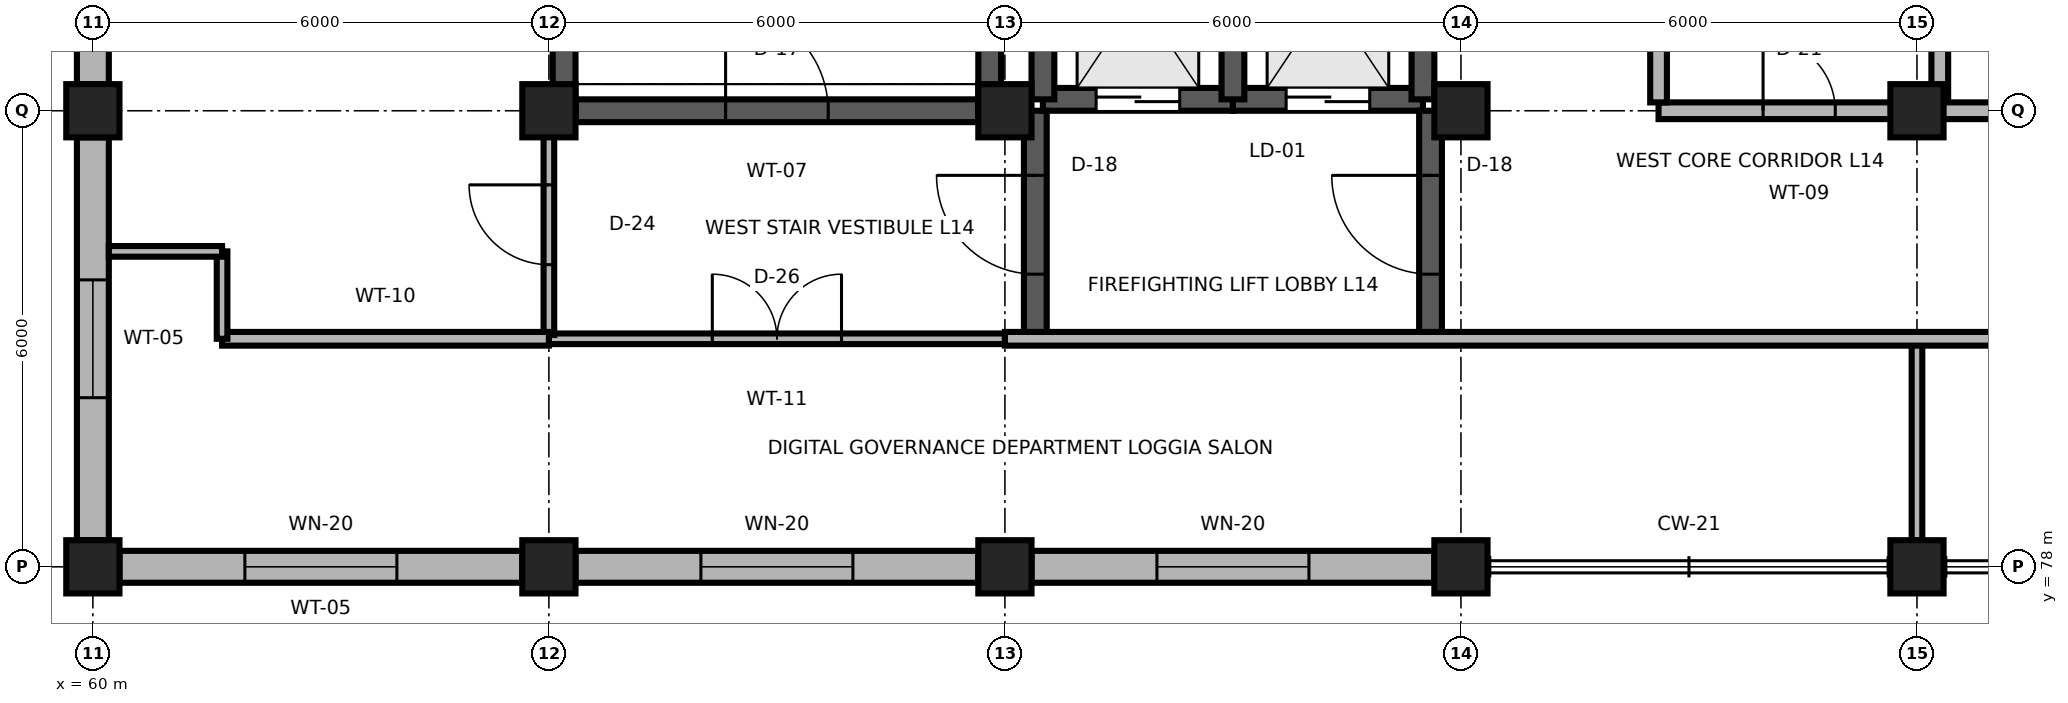
"""IFC4 building model, lengths in metres.
Left out: names, types, materials, properties, quantities, classifications, styles, units other than length and angle.
Written with IfcOpenShell. Run it as: python <this file> out.ifc"""

import sys

from ifc_helpers import new_model, si_unit, direction, frame, frame_2d, origin, origin_2d, place, context, subcontext, project, spatial, rectangle, extrude, element, fill, save


model = new_model("IFC4")
c1 = context("Model", 3, precision=1e-05, world=origin(), true_north=direction((0.0, 1.0)))
c2 = subcontext(c1, "Body", "Model", "MODEL_VIEW")
j1 = project(units=[si_unit("LENGTHUNIT", "METRE"), si_unit("PLANEANGLEUNIT", "RADIAN")], contexts=[c1])
p1 = place(None, origin())
s1 = spatial("IfcSite", under=j1, at=p1, CompositionType="ELEMENT")
p2 = place(p1, origin())
s2 = spatial("IfcBuilding", under=s1, at=p2, CompositionType="ELEMENT")
p3 = place(p2, frame((0.0, 0.0, 56.1)))
s3 = spatial("IfcBuildingStorey", under=s2, at=p3, CompositionType="ELEMENT", Elevation=56.1)
for number, where, z_axis, x_axis in (
    (1, (60.0, 78.0, 0.0), (0.0, 0.0, 1.0), (1.0, 0.0, 0.0)),
    (2, (66.0, 78.0, 0.0), (0.0, 0.0, 1.0), (1.0, 0.0, 0.0)),
    (3, (72.0, 78.0, 0.0), (0.0, 0.0, 1.0), (1.0, 0.0, 0.0)),
    (4, (78.0, 78.0, 0.0), (0.0, 0.0, 1.0), (1.0, 0.0, 0.0)),
    (5, (84.0, 78.0, 0.0), (0.0, 0.0, 1.0), (1.0, 0.0, 0.0)),
    (6, (60.0, 84.0, 0.0), (0.0, 0.0, 1.0), (1.0, 0.0, 0.0)),
    (7, (66.0, 84.0, 0.0), (0.0, 0.0, 1.0), (1.0, 0.0, 0.0)),
    (8, (72.0, 84.0, 0.0), (0.0, 0.0, 1.0), (1.0, 0.0, 0.0)),
    (9, (78.0, 84.0, 0.0), (0.0, 0.0, 1.0), (1.0, 0.0, 0.0)),
    (10, (84.0, 84.0, 0.0), (0.0, 0.0, 1.0), (1.0, 0.0, 0.0)),
):
    element("IfcColumn", number, at=place(p3, frame(where, z_axis=z_axis, x_axis=x_axis)), inside=s3, PredefinedType="COLUMN", context=c2, shape_type="SweptSolid", body=[
        extrude(rectangle(XDim=0.7, YDim=0.7, at=origin_2d()), origin(), (0.0, 0.0, 1.0), 3.9),
    ])
p4 = place(p3, frame((60.35, 78.0, 0.0), z_axis=(0.0, 0.0, 1.0), x_axis=(1.0, 0.0, 0.0)))
e11 = element("IfcWall", 11, at=p4, inside=s3, PredefinedType="SOLIDWALL", context=c2, shape_type="SweptSolid", body=[
    extrude(rectangle(XDim=5.3, YDim=0.42, at=frame_2d((2.65, 0.0))), origin(), (0.0, 0.0, 1.0), 3.32),
])
p5 = place(p4, frame((1.65, 0.0, 0.85)))
e12 = element("IfcOpeningElement", 12, at=p5, cuts=e11, PredefinedType="OPENING", context=c2, shape_type="SweptSolid", body=[
    extrude(rectangle(XDim=2.0, YDim=1.95, at=frame_2d((1.0, 0.975))), frame((0.0, 0.225, 0.0), z_axis=(0.0, -1.0, 0.0), x_axis=(1.0, 0.0, 0.0)), (0.0, 0.0, 1.0), 0.45),
])
p6 = place(p3, frame((66.35, 78.0, 0.0), z_axis=(0.0, 0.0, 1.0), x_axis=(1.0, 0.0, 0.0)))
e13 = element("IfcWall", 13, at=p6, inside=s3, PredefinedType="SOLIDWALL", context=c2, shape_type="SweptSolid", body=[
    extrude(rectangle(XDim=5.3, YDim=0.42, at=frame_2d((2.65, 0.0))), origin(), (0.0, 0.0, 1.0), 3.32),
])
p7 = place(p6, frame((1.65, 0.0, 0.85)))
e14 = element("IfcOpeningElement", 14, at=p7, cuts=e13, PredefinedType="OPENING", context=c2, shape_type="SweptSolid", body=[
    extrude(rectangle(XDim=2.0, YDim=1.95, at=frame_2d((1.0, 0.975))), frame((0.0, 0.225, 0.0), z_axis=(0.0, -1.0, 0.0), x_axis=(1.0, 0.0, 0.0)), (0.0, 0.0, 1.0), 0.45),
])
p8 = place(p3, frame((72.35, 78.0, 0.0), z_axis=(0.0, 0.0, 1.0), x_axis=(1.0, 0.0, 0.0)))
e15 = element("IfcWall", 15, at=p8, inside=s3, PredefinedType="SOLIDWALL", context=c2, shape_type="SweptSolid", body=[
    extrude(rectangle(XDim=5.3, YDim=0.42, at=frame_2d((2.65, 0.0))), origin(), (0.0, 0.0, 1.0), 3.32),
])
p9 = place(p8, frame((1.65, 0.0, 0.85)))
e16 = element("IfcOpeningElement", 16, at=p9, cuts=e15, PredefinedType="OPENING", context=c2, shape_type="SweptSolid", body=[
    extrude(rectangle(XDim=2.0, YDim=1.95, at=frame_2d((1.0, 0.975))), frame((0.0, 0.225, 0.0), z_axis=(0.0, -1.0, 0.0), x_axis=(1.0, 0.0, 0.0)), (0.0, 0.0, 1.0), 0.45),
])
p10 = place(p3, frame((60.0, 78.35, 0.0), z_axis=(0.0, 0.0, 1.0), x_axis=(0.0, 1.0, 0.0)))
e17 = element("IfcWall", 17, at=p10, inside=s3, PredefinedType="SOLIDWALL", context=c2, shape_type="SweptSolid", body=[
    extrude(rectangle(XDim=5.3, YDim=0.42, at=frame_2d((2.65, 0.0))), origin(), (0.0, 0.0, 1.0), 3.32),
])
p11 = place(p10, frame((1.875, 0.0, 0.85)))
e18 = element("IfcOpeningElement", 18, at=p11, cuts=e17, PredefinedType="OPENING", context=c2, shape_type="SweptSolid", body=[
    extrude(rectangle(XDim=1.55, YDim=1.9, at=frame_2d((0.775, 0.95))), frame((0.0, 0.225, 0.0), z_axis=(0.0, -1.0, 0.0), x_axis=(1.0, 0.0, 0.0)), (0.0, 0.0, 1.0), 0.45),
])
p12 = place(p3, frame((60.0, 84.35, 0.0), z_axis=(0.0, 0.0, 1.0), x_axis=(0.0, 1.0, 0.0)))
e19 = element("IfcWall", 19, at=p12, inside=s3, PredefinedType="SOLIDWALL", context=c2, shape_type="SweptSolid", body=[
    extrude(rectangle(XDim=5.3, YDim=0.42, at=frame_2d((2.65, 0.0))), origin(), (0.0, 0.0, 1.0), 3.32),
])
p13 = place(p12, frame((1.875, 0.0, 0.85)))
e20 = element("IfcOpeningElement", 20, at=p13, cuts=e19, PredefinedType="OPENING", context=c2, shape_type="SweptSolid", body=[
    extrude(rectangle(XDim=1.55, YDim=1.9, at=frame_2d((0.775, 0.95))), frame((0.0, 0.225, 0.0), z_axis=(0.0, -1.0, 0.0), x_axis=(1.0, 0.0, 0.0)), (0.0, 0.0, 1.0), 0.45),
])
p14 = place(p3, frame((66.35, 84.0, 0.0), z_axis=(0.0, 0.0, 1.0), x_axis=(1.0, 0.0, 0.0)))
e21 = element("IfcWall", 21, at=p14, inside=s3, PredefinedType="SHEAR", context=c2, shape_type="SweptSolid", body=[
    extrude(rectangle(XDim=5.3, YDim=0.3, at=frame_2d((2.65, 0.0))), origin(), (0.0, 0.0, 1.0), 3.66),
])
p15 = place(p14, frame((1.975, 0.0, 0.0)))
e22 = element("IfcOpeningElement", 22, at=p15, cuts=e21, PredefinedType="OPENING", context=c2, shape_type="SweptSolid", body=[
    extrude(rectangle(XDim=1.35, YDim=2.2, at=frame_2d((0.675, 1.1))), frame((0.0, 0.165, 0.0), z_axis=(0.0, -1.0, 0.0), x_axis=(1.0, 0.0, 0.0)), (0.0, 0.0, 1.0), 0.33),
])
for number, where, z_axis, x_axis in (
    (23, (66.2, 84.0, 0.0), (0.0, 0.0, 1.0), (0.0, 1.0, 0.0)),
    (24, (71.8, 84.0, 0.0), (0.0, 0.0, 1.0), (0.0, 1.0, 0.0)),
):
    element("IfcWall", number, at=place(p3, frame(where, z_axis=z_axis, x_axis=x_axis)), inside=s3, PredefinedType="SHEAR", context=c2, shape_type="SweptSolid", body=[
        extrude(rectangle(XDim=11.8, YDim=0.3, at=frame_2d((5.9, 0.0))), origin(), (0.0, 0.0, 1.0), 3.74),
    ])
p16 = place(p3, frame((72.5, 84.15, 0.0), z_axis=(0.0, 0.0, 1.0), x_axis=(1.0, 0.0, 0.0)))
e25 = element("IfcWall", 25, at=p16, inside=s3, PredefinedType="SHEAR", context=c2, shape_type="SweptSolid", body=[
    extrude(rectangle(XDim=2.5, YDim=0.3, at=frame_2d((1.25, 0.0))), origin(), (0.0, 0.0, 1.0), 3.74),
])
p17 = place(p16, frame((0.7, 0.0, 0.0)))
e26 = element("IfcOpeningElement", 26, at=p17, cuts=e25, PredefinedType="OPENING", context=c2, shape_type="SweptSolid", body=[
    extrude(rectangle(XDim=1.1, YDim=2.1, at=frame_2d((0.55, 1.05))), frame((0.0, 0.165, 0.0), z_axis=(0.0, -1.0, 0.0), x_axis=(1.0, 0.0, 0.0)), (0.0, 0.0, 1.0), 0.33),
])
p18 = place(p3, frame((72.5, 84.15, 0.0), z_axis=(0.0, 0.0, 1.0), x_axis=(0.0, 1.0, 0.0)))
e27 = element("IfcWall", 27, at=p18, inside=s3, PredefinedType="SHEAR", context=c2, shape_type="SweptSolid", body=[
    extrude(rectangle(XDim=3.4, YDim=0.3, at=frame_2d((1.7, 0.0))), origin(), (0.0, 0.0, 1.0), 3.74),
])
p19 = place(p3, frame((75.0, 84.15, 0.0), z_axis=(0.0, 0.0, 1.0), x_axis=(1.0, 0.0, 0.0)))
e28 = element("IfcWall", 28, at=p19, inside=s3, PredefinedType="SHEAR", context=c2, shape_type="SweptSolid", body=[
    extrude(rectangle(XDim=2.5, YDim=0.3, at=frame_2d((1.25, 0.0))), origin(), (0.0, 0.0, 1.0), 3.74),
])
p20 = place(p19, frame((0.7, 0.0, 0.0)))
e29 = element("IfcOpeningElement", 29, at=p20, cuts=e28, PredefinedType="OPENING", context=c2, shape_type="SweptSolid", body=[
    extrude(rectangle(XDim=1.1, YDim=2.1, at=frame_2d((0.55, 1.05))), frame((0.0, 0.165, 0.0), z_axis=(0.0, -1.0, 0.0), x_axis=(1.0, 0.0, 0.0)), (0.0, 0.0, 1.0), 0.33),
])
for number, where, z_axis, x_axis in (
    (30, (75.0, 84.15, 0.0), (0.0, 0.0, 1.0), (0.0, 1.0, 0.0)),
    (31, (77.5, 84.15, 0.0), (0.0, 0.0, 1.0), (0.0, 1.0, 0.0)),
):
    element("IfcWall", number, at=place(p3, frame(where, z_axis=z_axis, x_axis=x_axis)), inside=s3, PredefinedType="SHEAR", context=c2, shape_type="SweptSolid", body=[
        extrude(rectangle(XDim=3.4, YDim=0.3, at=frame_2d((1.7, 0.0))), origin(), (0.0, 0.0, 1.0), 3.74),
    ])
p21 = place(p3, frame((72.4, 81.0, 0.0), z_axis=(0.0, 0.0, 1.0), x_axis=(0.0, 1.0, 0.0)))
e32 = element("IfcWall", 32, at=p21, inside=s3, PredefinedType="SHEAR", context=c2, shape_type="SweptSolid", body=[
    extrude(rectangle(XDim=3.0, YDim=0.3, at=frame_2d((1.5, 0.0))), origin(), (0.0, 0.0, 1.0), 3.74),
])
p22 = place(p21, frame((0.85, 0.0, 0.0)))
e33 = element("IfcOpeningElement", 33, at=p22, cuts=e32, PredefinedType="OPENING", context=c2, shape_type="SweptSolid", body=[
    extrude(rectangle(XDim=1.3, YDim=2.2, at=frame_2d((0.65, 1.1))), frame((0.0, 0.165, 0.0), z_axis=(0.0, -1.0, 0.0), x_axis=(1.0, 0.0, 0.0)), (0.0, 0.0, 1.0), 0.33),
])
p23 = place(p3, frame((77.6, 81.0, 0.0), z_axis=(0.0, 0.0, 1.0), x_axis=(0.0, 1.0, 0.0)))
e34 = element("IfcWall", 34, at=p23, inside=s3, PredefinedType="SHEAR", context=c2, shape_type="SweptSolid", body=[
    extrude(rectangle(XDim=3.0, YDim=0.3, at=frame_2d((1.5, 0.0))), origin(), (0.0, 0.0, 1.0), 3.74),
])
p24 = place(p23, frame((0.85, 0.0, 0.0)))
e35 = element("IfcOpeningElement", 35, at=p24, cuts=e34, PredefinedType="OPENING", context=c2, shape_type="SweptSolid", body=[
    extrude(rectangle(XDim=1.3, YDim=2.2, at=frame_2d((0.65, 1.1))), frame((0.0, 0.165, 0.0), z_axis=(0.0, -1.0, 0.0), x_axis=(1.0, 0.0, 0.0)), (0.0, 0.0, 1.0), 0.33),
])
p25 = place(p3, frame((80.6, 84.0, 0.0), z_axis=(0.0, 0.0, 1.0), x_axis=(1.0, 0.0, 0.0)))
e36 = element("IfcWall", 36, at=p25, inside=s3, PredefinedType="PARTITIONING", context=c2, shape_type="SweptSolid", body=[
    extrude(rectangle(XDim=3.7, YDim=0.22, at=frame_2d((1.85, 0.0))), origin(), (0.0, 0.0, 1.0), 3.449),
])
p26 = place(p25, frame((1.375, 0.0, 0.0)))
e37 = element("IfcOpeningElement", 37, at=p26, cuts=e36, PredefinedType="OPENING", context=c2, shape_type="SweptSolid", body=[
    extrude(rectangle(XDim=0.95, YDim=2.15, at=frame_2d((0.475, 1.075))), frame((0.0, 0.125, 0.0), z_axis=(0.0, -1.0, 0.0), x_axis=(1.0, 0.0, 0.0)), (0.0, 0.0, 1.0), 0.25),
])
p27 = place(p3, frame((84.3, 84.0, 0.0), z_axis=(0.0, 0.0, 1.0), x_axis=(1.0, 0.0, 0.0)))
e38 = element("IfcWall", 38, at=p27, inside=s3, PredefinedType="PARTITIONING", context=c2, shape_type="SweptSolid", body=[
    extrude(rectangle(XDim=3.5, YDim=0.22, at=frame_2d((1.75, 0.0))), origin(), (0.0, 0.0, 1.0), 3.449),
])
p28 = place(p27, frame((1.275, 0.0, 0.0)))
e39 = element("IfcOpeningElement", 39, at=p28, cuts=e38, PredefinedType="OPENING", context=c2, shape_type="SweptSolid", body=[
    extrude(rectangle(XDim=0.95, YDim=2.1, at=frame_2d((0.475, 1.05))), frame((0.0, 0.125, 0.0), z_axis=(0.0, -1.0, 0.0), x_axis=(1.0, 0.0, 0.0)), (0.0, 0.0, 1.0), 0.25),
])
p29 = place(p3, frame((84.3, 84.15, 0.0), z_axis=(0.0, 0.0, 1.0), x_axis=(0.0, 1.0, 0.0)))
e40 = element("IfcWall", 40, at=p29, inside=s3, PredefinedType="PARTITIONING", context=c2, shape_type="SweptSolid", body=[
    extrude(rectangle(XDim=5.0, YDim=0.22, at=frame_2d((2.5, 0.0))), origin(), (0.0, 0.0, 1.0), 3.74),
])
p30 = place(p3, frame((66.0, 81.0, 0.0), z_axis=(0.0, 0.0, 1.0), x_axis=(1.0, 0.0, 0.0)))
e41 = element("IfcWall", 41, at=p30, inside=s3, PredefinedType="PARTITIONING", context=c2, shape_type="SweptSolid", body=[
    extrude(rectangle(XDim=6.0, YDim=0.14, at=frame_2d((3.0, 0.0))), origin(), (0.0, 0.0, 1.0), 3.74),
])
p31 = place(p30, frame((2.15, 0.0, 0.0)))
e42 = element("IfcOpeningElement", 42, at=p31, cuts=e41, PredefinedType="OPENING", context=c2, shape_type="SweptSolid", body=[
    extrude(rectangle(XDim=1.7, YDim=2.45, at=frame_2d((0.85, 1.225))), frame((0.0, 0.085, 0.0), z_axis=(0.0, -1.0, 0.0), x_axis=(1.0, 0.0, 0.0)), (0.0, 0.0, 1.0), 0.17),
])
p32 = place(p3, frame((66.0, 81.05, 0.0), z_axis=(0.0, 0.0, 1.0), x_axis=(0.0, 1.0, 0.0)))
e43 = element("IfcWall", 43, at=p32, inside=s3, PredefinedType="PARTITIONING", context=c2, shape_type="SweptSolid", body=[
    extrude(rectangle(XDim=2.9, YDim=0.14, at=frame_2d((1.45, 0.0))), origin(), (0.0, 0.0, 1.0), 3.449),
])
p33 = place(p32, frame((0.925, 0.0, 0.0)))
e44 = element("IfcOpeningElement", 44, at=p33, cuts=e43, PredefinedType="OPENING", context=c2, shape_type="SweptSolid", body=[
    extrude(rectangle(XDim=1.05, YDim=2.25, at=frame_2d((0.525, 1.125))), frame((0.0, 0.085, 0.0), z_axis=(0.0, -1.0, 0.0), x_axis=(1.0, 0.0, 0.0)), (0.0, 0.0, 1.0), 0.17),
])
p34 = place(p3, frame((84.0, 78.35, 0.0), z_axis=(0.0, 0.0, 1.0), x_axis=(0.0, 1.0, 0.0)))
e45 = element("IfcWall", 45, at=p34, inside=s3, PredefinedType="PARTITIONING", context=c2, shape_type="SweptSolid", body=[
    extrude(rectangle(XDim=2.65, YDim=0.14, at=frame_2d((1.325, 0.0))), origin(), (0.0, 0.0, 1.0), 3.449),
])
p35 = place(p3, frame((80.6, 84.11, 0.0), z_axis=(0.0, 0.0, 1.0), x_axis=(0.0, 1.0, 0.0)))
e46 = element("IfcWall", 46, at=p35, inside=s3, PredefinedType="PARTITIONING", context=c2, shape_type="SweptSolid", body=[
    extrude(rectangle(XDim=4.98, YDim=0.22, at=frame_2d((2.49, 0.0))), origin(), (0.0, 0.0, 1.0), 3.74),
])
p36 = place(p3, frame((61.7, 81.0, 0.0), z_axis=(0.0, 0.0, 1.0), x_axis=(1.0, 0.0, 0.0)))
e47 = element("IfcWall", 47, at=p36, inside=s3, PredefinedType="PARTITIONING", context=c2, shape_type="SweptSolid", body=[
    extrude(rectangle(XDim=4.3, YDim=0.18, at=frame_2d((2.15, 0.0))), origin(), (0.0, 0.0, 1.0), 3.74),
])
p37 = place(p3, frame((72.0, 81.0, 0.0), z_axis=(0.0, 0.0, 1.0), x_axis=(1.0, 0.0, 0.0)))
e48 = element("IfcWall", 48, at=p37, inside=s3, PredefinedType="PARTITIONING", context=c2, shape_type="SweptSolid", body=[
    extrude(rectangle(XDim=18.0, YDim=0.18, at=frame_2d((9.0, 0.0))), origin(), (0.0, 0.0, 1.0), 3.74),
])
p38 = place(p3, frame((61.7, 81.0, 0.0), z_axis=(0.0, 0.0, 1.0), x_axis=(0.0, 1.0, 0.0)))
e49 = element("IfcWall", 49, at=p38, inside=s3, PredefinedType="PARTITIONING", context=c2, shape_type="SweptSolid", body=[
    extrude(rectangle(XDim=1.15, YDim=0.14, at=frame_2d((0.575, 0.0))), origin(), (0.0, 0.0, 1.0), 3.74),
])
p39 = place(p3, frame((61.7, 82.15, 0.0), z_axis=(0.0, 0.0, 1.0), x_axis=(-1.0, 0.0, 0.0)))
e50 = element("IfcWall", 50, at=p39, inside=s3, PredefinedType="PARTITIONING", context=c2, shape_type="SweptSolid", body=[
    extrude(rectangle(XDim=1.49, YDim=0.14, at=frame_2d((0.745, 0.0))), origin(), (0.0, 0.0, 1.0), 3.74),
])
p40 = place(p5, origin())
e51 = element("IfcWindow", 51, at=p40, inside=s3, PartitioningType="SINGLE_PANEL", PredefinedType="WINDOW", context=c2, shape_type="SweptSolid", body=[
    extrude(rectangle(XDim=2.0, YDim=1.95, at=frame_2d((1.0, 0.975))), frame((0.0, 0.03, 0.0), z_axis=(0.0, -1.0, 0.0), x_axis=(1.0, 0.0, 0.0)), (0.0, 0.0, 1.0), 0.06),
])
fill(e12, e51)
p41 = place(p7, origin())
e52 = element("IfcWindow", 52, at=p41, inside=s3, PartitioningType="SINGLE_PANEL", PredefinedType="WINDOW", context=c2, shape_type="SweptSolid", body=[
    extrude(rectangle(XDim=2.0, YDim=1.95, at=frame_2d((1.0, 0.975))), frame((0.0, 0.03, 0.0), z_axis=(0.0, -1.0, 0.0), x_axis=(1.0, 0.0, 0.0)), (0.0, 0.0, 1.0), 0.06),
])
fill(e14, e52)
p42 = place(p9, origin())
e53 = element("IfcWindow", 53, at=p42, inside=s3, PartitioningType="SINGLE_PANEL", PredefinedType="WINDOW", context=c2, shape_type="SweptSolid", body=[
    extrude(rectangle(XDim=2.0, YDim=1.95, at=frame_2d((1.0, 0.975))), frame((0.0, 0.03, 0.0), z_axis=(0.0, -1.0, 0.0), x_axis=(1.0, 0.0, 0.0)), (0.0, 0.0, 1.0), 0.06),
])
fill(e16, e53)
p43 = place(p11, origin())
e54 = element("IfcWindow", 54, at=p43, inside=s3, PartitioningType="SINGLE_PANEL", PredefinedType="WINDOW", context=c2, shape_type="SweptSolid", body=[
    extrude(rectangle(XDim=1.55, YDim=1.9, at=frame_2d((0.775, 0.95))), frame((0.0, 0.03, 0.0), z_axis=(0.0, -1.0, 0.0), x_axis=(1.0, 0.0, 0.0)), (0.0, 0.0, 1.0), 0.06),
])
fill(e18, e54)
p44 = place(p15, origin())
e55 = element("IfcDoor", 55, at=p44, inside=s3, OperationType="SINGLE_SWING_LEFT", PredefinedType="DOOR", context=c2, shape_type="SweptSolid", body=[
    extrude(rectangle(XDim=1.35, YDim=2.2, at=frame_2d((0.675, 1.1))), frame((0.0, 0.025, 0.0), z_axis=(0.0, -1.0, 0.0), x_axis=(1.0, 0.0, 0.0)), (0.0, 0.0, 1.0), 0.05),
])
fill(e22, e55)
p45 = place(p17, origin())
e56 = element("IfcDoor", 56, at=p45, inside=s3, OperationType="DOUBLE_DOOR_SLIDING", PredefinedType="DOOR", context=c2, shape_type="SweptSolid", body=[
    extrude(rectangle(XDim=1.1, YDim=2.1, at=frame_2d((0.55, 1.05))), frame((0.0, 0.025, 0.0), z_axis=(0.0, -1.0, 0.0), x_axis=(1.0, 0.0, 0.0)), (0.0, 0.0, 1.0), 0.05),
])
fill(e26, e56)
p46 = place(p20, origin())
e57 = element("IfcDoor", 57, at=p46, inside=s3, OperationType="DOUBLE_DOOR_SLIDING", PredefinedType="DOOR", context=c2, shape_type="SweptSolid", body=[
    extrude(rectangle(XDim=1.1, YDim=2.1, at=frame_2d((0.55, 1.05))), frame((0.0, 0.025, 0.0), z_axis=(0.0, -1.0, 0.0), x_axis=(1.0, 0.0, 0.0)), (0.0, 0.0, 1.0), 0.05),
])
fill(e29, e57)
p47 = place(p22, origin())
e58 = element("IfcDoor", 58, at=p47, inside=s3, OperationType="SINGLE_SWING_RIGHT", PredefinedType="DOOR", context=c2, shape_type="SweptSolid", body=[
    extrude(rectangle(XDim=1.3, YDim=2.2, at=frame_2d((0.65, 1.1))), frame((0.0, 0.025, 0.0), z_axis=(0.0, -1.0, 0.0), x_axis=(1.0, 0.0, 0.0)), (0.0, 0.0, 1.0), 0.05),
])
fill(e33, e58)
p48 = place(p24, origin())
e59 = element("IfcDoor", 59, at=p48, inside=s3, OperationType="SINGLE_SWING_RIGHT", PredefinedType="DOOR", context=c2, shape_type="SweptSolid", body=[
    extrude(rectangle(XDim=1.3, YDim=2.2, at=frame_2d((0.65, 1.1))), frame((0.0, 0.025, 0.0), z_axis=(0.0, -1.0, 0.0), x_axis=(1.0, 0.0, 0.0)), (0.0, 0.0, 1.0), 0.05),
])
fill(e35, e59)
p49 = place(p26, origin())
e60 = element("IfcDoor", 60, at=p49, inside=s3, OperationType="SINGLE_SWING_LEFT", PredefinedType="DOOR", context=c2, shape_type="SweptSolid", body=[
    extrude(rectangle(XDim=0.95, YDim=2.15, at=frame_2d((0.475, 1.075))), frame((0.0, 0.025, 0.0), z_axis=(0.0, -1.0, 0.0), x_axis=(1.0, 0.0, 0.0)), (0.0, 0.0, 1.0), 0.05),
])
fill(e37, e60)
p50 = place(p31, origin())
e61 = element("IfcDoor", 61, at=p50, inside=s3, OperationType="DOUBLE_DOOR_SINGLE_SWING", PredefinedType="DOOR", context=c2, shape_type="SweptSolid", body=[
    extrude(rectangle(XDim=1.7, YDim=2.45, at=frame_2d((0.85, 1.225))), frame((0.0, 0.025, 0.0), z_axis=(0.0, -1.0, 0.0), x_axis=(1.0, 0.0, 0.0)), (0.0, 0.0, 1.0), 0.05),
])
fill(e42, e61)
p51 = place(p33, origin())
e62 = element("IfcDoor", 62, at=p51, inside=s3, OperationType="SINGLE_SWING_RIGHT", PredefinedType="DOOR", context=c2, shape_type="SweptSolid", body=[
    extrude(rectangle(XDim=1.05, YDim=2.25, at=frame_2d((0.525, 1.125))), frame((0.0, 0.025, 0.0), z_axis=(0.0, -1.0, 0.0), x_axis=(1.0, 0.0, 0.0)), (0.0, 0.0, 1.0), 0.05),
])
fill(e44, e62)
save(model, sys.argv[1])
